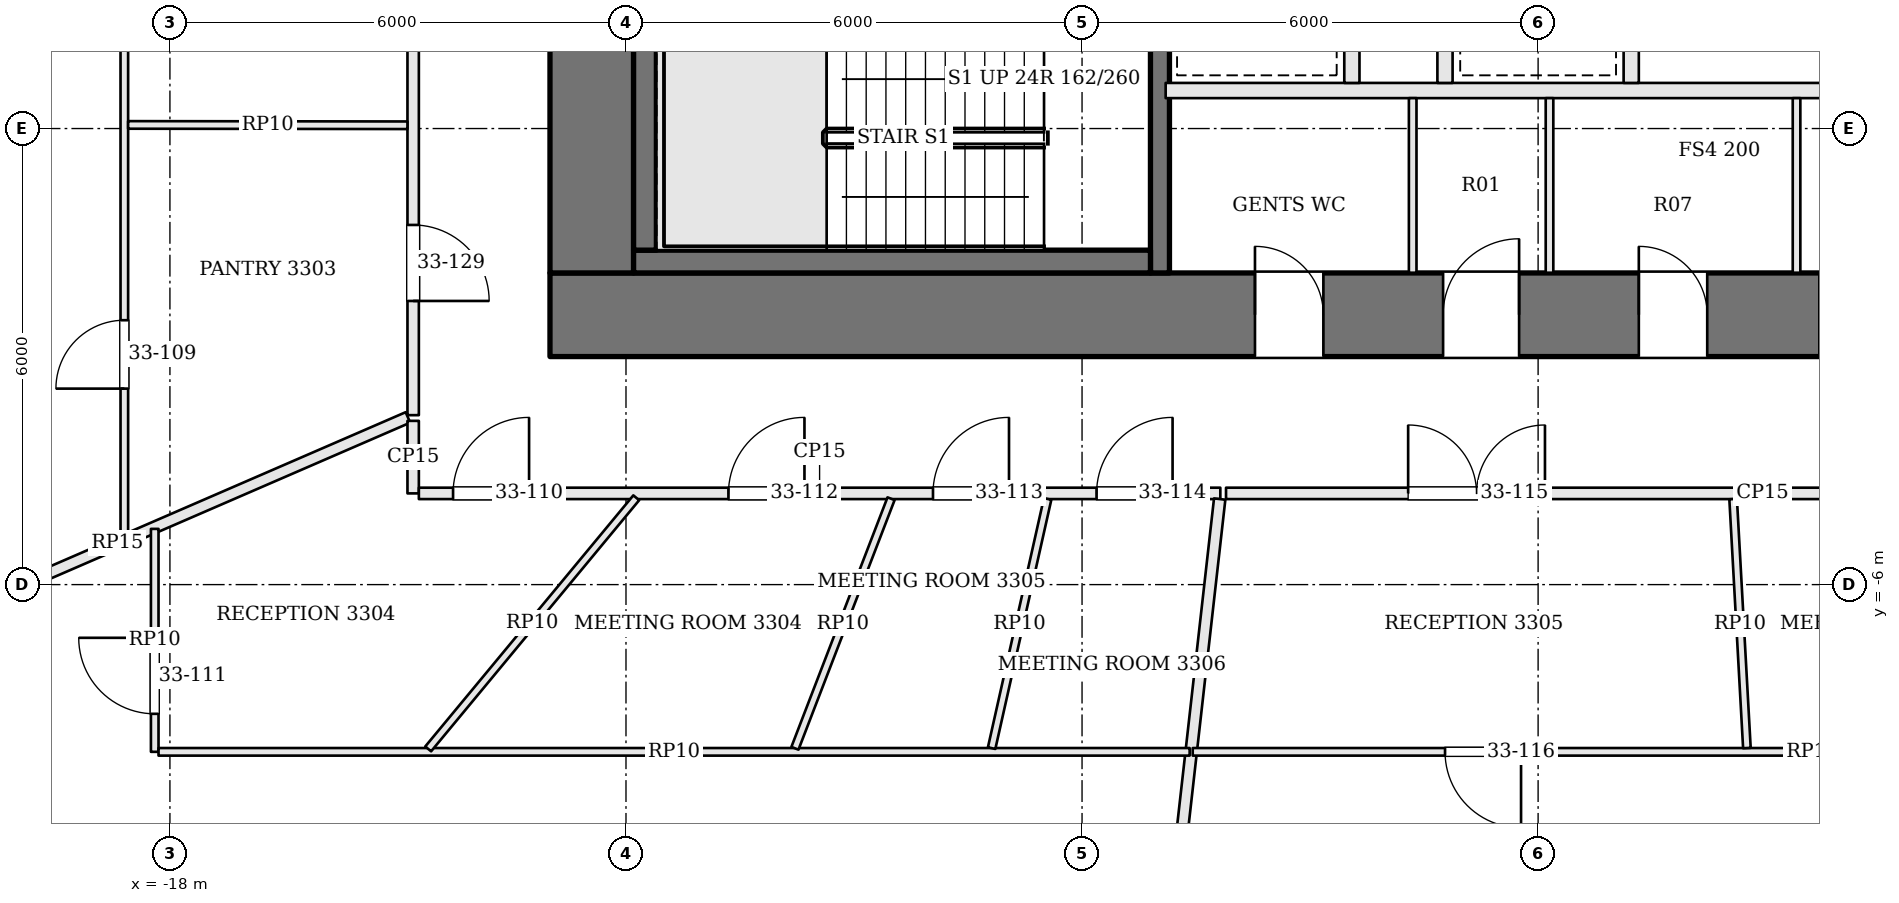
"""IFC4 building model, lengths in metres.
Left out: names, types, materials, properties, quantities, classifications, styles, units other than length and angle.
Written with IfcOpenShell. Run it as: python <this file> out.ifc"""

import sys

from ifc_helpers import new_model, si_unit, direction, frame, frame_2d, origin, place, context, subcontext, project, spatial, rectangle, extrude, element, fill, save


model = new_model("IFC4")
c1 = context("Model", 3, precision=1e-05, world=origin(), true_north=direction((0.0, 1.0)))
c2 = subcontext(c1, "Body", "Model", "MODEL_VIEW")
j1 = project(units=[si_unit("LENGTHUNIT", "METRE"), si_unit("PLANEANGLEUNIT", "RADIAN")], contexts=[c1])
p1 = place(None, origin())
s1 = spatial("IfcSite", under=j1, at=p1, CompositionType="ELEMENT")
p2 = place(p1, origin())
s2 = spatial("IfcBuilding", under=s1, at=p2, CompositionType="ELEMENT")
p3 = place(p2, frame((0.0, 0.0, 138.3)))
s3 = spatial("IfcBuildingStorey", under=s2, at=p3, CompositionType="ELEMENT", Elevation=138.3)
p4 = place(p3, frame((-13.0, -2.45, 0.0), z_axis=(0.0, 0.0, 1.0), x_axis=(1.0, 0.0, 0.0)))
e1 = element("IfcWall", 1, at=p4, inside=s3, PredefinedType="SHEAR", context=c2, shape_type="SweptSolid", body=[
    extrude(rectangle(XDim=26.0, YDim=1.1, at=frame_2d((13.0, 0.0))), origin(), (0.0, 0.0, 1.0), 3.9),
])
p5 = place(p4, frame((9.275, 0.0, 0.0)))
e2 = element("IfcOpeningElement", 2, at=p5, cuts=e1, PredefinedType="OPENING", context=c2, shape_type="SweptSolid", body=[
    extrude(rectangle(XDim=0.9, YDim=2.1, at=frame_2d((0.45, 1.05))), frame((0.0, 0.56, 0.0), z_axis=(0.0, -1.0, 0.0), x_axis=(1.0, 0.0, 0.0)), (0.0, 0.0, 1.0), 1.12),
])
p6 = place(p4, frame((11.75, 0.0, 0.0)))
e3 = element("IfcOpeningElement", 3, at=p6, cuts=e1, PredefinedType="OPENING", context=c2, shape_type="SweptSolid", body=[
    extrude(rectangle(XDim=1.0, YDim=2.1, at=frame_2d((0.5, 1.05))), frame((0.0, 0.56, 0.0), z_axis=(0.0, -1.0, 0.0), x_axis=(1.0, 0.0, 0.0)), (0.0, 0.0, 1.0), 1.12),
])
p7 = place(p4, frame((14.325, 0.0, 0.0)))
e4 = element("IfcOpeningElement", 4, at=p7, cuts=e1, PredefinedType="OPENING", context=c2, shape_type="SweptSolid", body=[
    extrude(rectangle(XDim=0.9, YDim=2.1, at=frame_2d((0.45, 1.05))), frame((0.0, 0.56, 0.0), z_axis=(0.0, -1.0, 0.0), x_axis=(1.0, 0.0, 0.0)), (0.0, 0.0, 1.0), 1.12),
])
p8 = place(p4, frame((16.7, 0.0, 0.0)))
e5 = element("IfcOpeningElement", 5, at=p8, cuts=e1, PredefinedType="OPENING", context=c2, shape_type="SweptSolid", body=[
    extrude(rectangle(XDim=0.9, YDim=2.1, at=frame_2d((0.45, 1.05))), frame((0.0, 0.56, 0.0), z_axis=(0.0, -1.0, 0.0), x_axis=(1.0, 0.0, 0.0)), (0.0, 0.0, 1.0), 1.12),
])
p9 = place(p3, frame((-12.45, -1.9, 0.0), z_axis=(0.0, 0.0, 1.0), x_axis=(0.0, 1.0, 0.0)))
e6 = element("IfcWall", 6, at=p9, inside=s3, PredefinedType="SHEAR", context=c2, shape_type="SweptSolid", body=[
    extrude(rectangle(XDim=12.8, YDim=1.1, at=frame_2d((6.4, 0.0))), origin(), (0.0, 0.0, 1.0), 3.9),
])
p10 = place(p9, frame((3.9, 0.0, 0.0)))
e7 = element("IfcOpeningElement", 7, at=p10, cuts=e6, PredefinedType="OPENING", context=c2, shape_type="SweptSolid", body=[
    extrude(rectangle(XDim=1.8, YDim=2.1, at=frame_2d((0.9, 1.05))), frame((0.0, 0.56, 0.0), z_axis=(0.0, -1.0, 0.0), x_axis=(1.0, 0.0, 0.0)), (0.0, 0.0, 1.0), 1.12),
])
p11 = place(p3, frame((-4.975, -1.9, 0.0), z_axis=(0.0, 0.0, 1.0), x_axis=(0.0, 1.0, 0.0)))
e8 = element("IfcWall", 8, at=p11, inside=s3, PredefinedType="SOLIDWALL", context=c2, shape_type="SweptSolid", body=[
    extrude(rectangle(XDim=12.8, YDim=0.25, at=frame_2d((6.4, 0.0))), origin(), (0.0, 0.0, 1.0), 3.7),
])
p12 = place(p11, frame((4.95, 0.0, 0.0)))
e9 = element("IfcOpeningElement", 9, at=p12, cuts=e8, PredefinedType="OPENING", context=c2, shape_type="SweptSolid", body=[
    extrude(rectangle(XDim=1.2, YDim=2.1, at=frame_2d((0.6, 1.05))), frame((0.0, 0.135, 0.0), z_axis=(0.0, -1.0, 0.0), x_axis=(1.0, 0.0, 0.0)), (0.0, 0.0, 1.0), 0.27),
])
p13 = place(p3, frame((-11.9, -1.75, 0.0), z_axis=(0.0, 0.0, 1.0), x_axis=(1.0, 0.0, 0.0)))
e10 = element("IfcWall", 10, at=p13, inside=s3, PredefinedType="SOLIDWALL", context=c2, shape_type="SweptSolid", body=[
    extrude(rectangle(XDim=6.8, YDim=0.3, at=frame_2d((3.4, 0.0))), origin(), (0.0, 0.0, 1.0), 3.7),
])
p14 = place(p3, frame((-11.75, -1.6, 0.0), z_axis=(0.0, 0.0, 1.0), x_axis=(0.0, 1.0, 0.0)))
e11 = element("IfcWall", 11, at=p14, inside=s3, PredefinedType="SOLIDWALL", context=c2, shape_type="SweptSolid", body=[
    extrude(rectangle(XDim=2.95, YDim=0.3, at=frame_2d((1.475, 0.0))), origin(), (0.0, 0.0, 1.0), 3.7),
])
p15 = place(p3, frame((-4.9, 0.5, 0.0), z_axis=(0.0, 0.0, 1.0), x_axis=(1.0, 0.0, 0.0)))
e12 = element("IfcWall", 12, at=p15, inside=s3, PredefinedType="SOLIDWALL", context=c2, shape_type="SweptSolid", body=[
    extrude(rectangle(XDim=9.8, YDim=0.2, at=frame_2d((4.9, 0.0))), origin(), (0.0, 0.0, 1.0), 3.7),
])
for number, where, z_axis, x_axis in (
    (13, (-2.45, 0.6, 0.0), (0.0, 0.0, 1.0), (0.0, 1.0, 0.0)),
    (14, (-1.225, 0.6, 0.0), (0.0, 0.0, 1.0), (0.0, 1.0, 0.0)),
    (15, (1.225, 0.6, 0.0), (0.0, 0.0, 1.0), (0.0, 1.0, 0.0)),
):
    element("IfcWall", number, at=place(p3, frame(where, z_axis=z_axis, x_axis=x_axis)), inside=s3, PredefinedType="SOLIDWALL", context=c2, shape_type="SweptSolid", body=[
        extrude(rectangle(XDim=2.2, YDim=0.2, at=frame_2d((1.1, 0.0))), origin(), (0.0, 0.0, 1.0), 3.7),
    ])
for number, where, z_axis, x_axis in (
    (16, (-1.65, -1.9, 0.0), (0.0, 0.0, 1.0), (0.0, 1.0, 0.0)),
    (17, (0.15, -1.9, 0.0), (0.0, 0.0, 1.0), (0.0, 1.0, 0.0)),
    (18, (3.4, -1.9, 0.0), (0.0, 0.0, 1.0), (0.0, 1.0, 0.0)),
):
    element("IfcWall", number, at=place(p3, frame(where, z_axis=z_axis, x_axis=x_axis)), inside=s3, PredefinedType="PARTITIONING", context=c2, shape_type="SweptSolid", body=[
        extrude(rectangle(XDim=2.3, YDim=0.1, at=frame_2d((1.15, 0.0))), origin(), (0.0, 0.0, 1.0), 3.7),
    ])
p16 = place(p3, frame((-14.8, 12.882, 0.0), z_axis=(0.0, 0.0, 1.0), x_axis=(0.0, -1.0, 0.0)))
e19 = element("IfcWall", 19, at=p16, inside=s3, PredefinedType="PARTITIONING", context=c2, shape_type="SweptSolid", body=[
    extrude(rectangle(XDim=16.652, YDim=0.15, at=frame_2d((8.326, 0.0))), origin(), (0.0, 0.0, 1.0), 3.198),
])
p17 = place(p16, frame((2.599, 0.0, 0.0)))
e20 = element("IfcOpeningElement", 20, at=p17, cuts=e19, PredefinedType="OPENING", context=c2, shape_type="SweptSolid", body=[
    extrude(rectangle(XDim=1.8, YDim=2.1, at=frame_2d((0.9, 1.05))), frame((0.0, 0.085, 0.0), z_axis=(0.0, -1.0, 0.0), x_axis=(1.0, 0.0, 0.0)), (0.0, 0.0, 1.0), 0.17),
])
p18 = place(p16, frame((9.456, 0.0, 0.0)))
e21 = element("IfcOpeningElement", 21, at=p18, cuts=e19, PredefinedType="OPENING", context=c2, shape_type="SweptSolid", body=[
    extrude(rectangle(XDim=1.0, YDim=2.4, at=frame_2d((0.5, 1.2))), frame((0.0, 0.085, 0.0), z_axis=(0.0, -1.0, 0.0), x_axis=(1.0, 0.0, 0.0)), (0.0, 0.0, 1.0), 0.17),
])
p19 = place(p16, frame((14.15, 0.0, 0.0)))
e22 = element("IfcOpeningElement", 22, at=p19, cuts=e19, PredefinedType="OPENING", context=c2, shape_type="SweptSolid", body=[
    extrude(rectangle(XDim=1.0, YDim=2.1, at=frame_2d((0.5, 1.05))), frame((0.0, 0.085, 0.0), z_axis=(0.0, -1.0, 0.0), x_axis=(1.0, 0.0, 0.0)), (0.0, 0.0, 1.0), 0.17),
])
p20 = place(p3, frame((-22.514, -7.116, 0.0), z_axis=(0.0, 0.0, 1.0), x_axis=(0.917457618692, 0.397833530392, 0.0)))
e23 = element("IfcWall", 23, at=p20, inside=s3, PredefinedType="PARTITIONING", context=c2, shape_type="SweptSolid", body=[
    extrude(rectangle(XDim=8.333, YDim=0.15, at=frame_2d((4.167, 0.0))), origin(), (0.0, 0.0, 1.0), 3.198),
])
p21 = place(p3, frame((-14.8, -3.846, 0.0), z_axis=(0.0, 0.0, 1.0), x_axis=(0.0, -1.0, 0.0)))
e24 = element("IfcWall", 24, at=p21, inside=s3, PredefinedType="PARTITIONING", context=c2, shape_type="SweptSolid", body=[
    extrude(rectangle(XDim=0.954, YDim=0.15, at=frame_2d((0.477, 0.0))), origin(), (0.0, 0.0, 1.0), 3.198),
])
p22 = place(p3, frame((-14.725, -4.8, 0.0), z_axis=(0.0, 0.0, 1.0), x_axis=(1.0, 0.0, 0.0)))
e25 = element("IfcWall", 25, at=p22, inside=s3, PredefinedType="PARTITIONING", context=c2, shape_type="SweptSolid", body=[
    extrude(rectangle(XDim=10.544, YDim=0.15, at=frame_2d((5.272, 0.0))), origin(), (0.0, 0.0, 1.0), 3.198),
])
p23 = place(p22, frame((0.45, 0.0, 0.0)))
e26 = element("IfcOpeningElement", 26, at=p23, cuts=e25, PredefinedType="OPENING", context=c2, shape_type="SweptSolid", body=[
    extrude(rectangle(XDim=1.0, YDim=2.1, at=frame_2d((0.5, 1.05))), frame((0.0, 0.085, 0.0), z_axis=(0.0, -1.0, 0.0), x_axis=(1.0, 0.0, 0.0)), (0.0, 0.0, 1.0), 0.17),
])
p24 = place(p22, frame((4.073, 0.0, 0.0)))
e27 = element("IfcOpeningElement", 27, at=p24, cuts=e25, PredefinedType="OPENING", context=c2, shape_type="SweptSolid", body=[
    extrude(rectangle(XDim=1.0, YDim=2.4, at=frame_2d((0.5, 1.2))), frame((0.0, 0.085, 0.0), z_axis=(0.0, -1.0, 0.0), x_axis=(1.0, 0.0, 0.0)), (0.0, 0.0, 1.0), 0.17),
])
p25 = place(p22, frame((6.764, 0.0, 0.0)))
e28 = element("IfcOpeningElement", 28, at=p25, cuts=e25, PredefinedType="OPENING", context=c2, shape_type="SweptSolid", body=[
    extrude(rectangle(XDim=1.0, YDim=2.4, at=frame_2d((0.5, 1.2))), frame((0.0, 0.085, 0.0), z_axis=(0.0, -1.0, 0.0), x_axis=(1.0, 0.0, 0.0)), (0.0, 0.0, 1.0), 0.17),
])
p26 = place(p22, frame((8.916, 0.0, 0.0)))
e29 = element("IfcOpeningElement", 29, at=p26, cuts=e25, PredefinedType="OPENING", context=c2, shape_type="SweptSolid", body=[
    extrude(rectangle(XDim=1.0, YDim=2.4, at=frame_2d((0.5, 1.2))), frame((0.0, 0.085, 0.0), z_axis=(0.0, -1.0, 0.0), x_axis=(1.0, 0.0, 0.0)), (0.0, 0.0, 1.0), 0.17),
])
p27 = place(p3, frame((-5.59, -17.294, 0.0), z_axis=(0.0, 0.0, 1.0), x_axis=(0.112047950982, 0.993702800983, 0.0)))
e30 = element("IfcWall", 30, at=p27, inside=s3, PredefinedType="PARTITIONING", context=c2, shape_type="SweptSolid", body=[
    extrude(rectangle(XDim=12.498, YDim=0.15, at=frame_2d((6.249, 0.0))), origin(), (0.0, 0.0, 1.0), 3.198),
])
p28 = place(p3, frame((-4.106, -4.8, 0.0), z_axis=(0.0, 0.0, 1.0), x_axis=(1.0, 0.0, 0.0)))
e31 = element("IfcWall", 31, at=p28, inside=s3, PredefinedType="PARTITIONING", context=c2, shape_type="SweptSolid", body=[
    extrude(rectangle(XDim=14.117, YDim=0.15, at=frame_2d((7.059, 0.0))), origin(), (0.0, 0.0, 1.0), 3.198),
])
p29 = place(p28, frame((2.396, 0.0, 0.0)))
e32 = element("IfcOpeningElement", 32, at=p29, cuts=e31, PredefinedType="OPENING", context=c2, shape_type="SweptSolid", body=[
    extrude(rectangle(XDim=1.8, YDim=2.1, at=frame_2d((0.9, 1.05))), frame((0.0, 0.085, 0.0), z_axis=(0.0, -1.0, 0.0), x_axis=(1.0, 0.0, 0.0)), (0.0, 0.0, 1.0), 0.17),
])
p30 = place(p28, frame((8.053, 0.0, 0.0)))
e33 = element("IfcOpeningElement", 33, at=p30, cuts=e31, PredefinedType="OPENING", context=c2, shape_type="SweptSolid", body=[
    extrude(rectangle(XDim=1.0, YDim=2.4, at=frame_2d((0.5, 1.2))), frame((0.0, 0.085, 0.0), z_axis=(0.0, -1.0, 0.0), x_axis=(1.0, 0.0, 0.0)), (0.0, 0.0, 1.0), 0.17),
])
p31 = place(p3, frame((-18.6, -5.397, 0.0), z_axis=(0.0, 0.0, 1.0), x_axis=(0.0, 1.0, 0.0)))
e34 = element("IfcWall", 34, at=p31, inside=s3, PredefinedType="PARTITIONING", context=c2, shape_type="SweptSolid", body=[
    extrude(rectangle(XDim=16.919, YDim=0.1, at=frame_2d((8.459, 0.0))), origin(), (0.0, 0.0, 1.0), 3.184),
])
p32 = place(p31, frame((1.975, 0.0, 0.0)))
e35 = element("IfcOpeningElement", 35, at=p32, cuts=e34, PredefinedType="OPENING", context=c2, shape_type="SweptSolid", body=[
    extrude(rectangle(XDim=0.9, YDim=2.1, at=frame_2d((0.45, 1.05))), frame((0.0, 0.06, 0.0), z_axis=(0.0, -1.0, 0.0), x_axis=(1.0, 0.0, 0.0)), (0.0, 0.0, 1.0), 0.12),
])
p33 = place(p31, frame((7.95, 0.0, 0.0)))
e36 = element("IfcOpeningElement", 36, at=p33, cuts=e34, PredefinedType="OPENING", context=c2, shape_type="SweptSolid", body=[
    extrude(rectangle(XDim=1.0, YDim=2.4, at=frame_2d((0.5, 1.2))), frame((0.0, 0.06, 0.0), z_axis=(0.0, -1.0, 0.0), x_axis=(1.0, 0.0, 0.0)), (0.0, 0.0, 1.0), 0.12),
])
p34 = place(p3, frame((-14.875, 0.043, 0.0), z_axis=(0.0, 0.0, 1.0), x_axis=(-0.999999285062, 0.001195774074, 0.0)))
e37 = element("IfcWall", 37, at=p34, inside=s3, PredefinedType="PARTITIONING", context=c2, shape_type="SweptSolid", body=[
    extrude(rectangle(XDim=3.675, YDim=0.1, at=frame_2d((1.837, 0.0))), origin(), (0.0, 0.0, 1.0), 3.184),
])
p35 = place(p3, frame((-18.2, -8.2, 0.0), z_axis=(0.0, 0.0, 1.0), x_axis=(0.0, 1.0, 0.0)))
e38 = element("IfcWall", 38, at=p35, inside=s3, PredefinedType="PARTITIONING", context=c2, shape_type="SweptSolid", body=[
    extrude(rectangle(XDim=2.933, YDim=0.1, at=frame_2d((1.467, 0.0))), origin(), (0.0, 0.0, 1.0), 3.184),
])
p36 = place(p35, frame((0.5, 0.0, 0.0)))
e39 = element("IfcOpeningElement", 39, at=p36, cuts=e38, PredefinedType="OPENING", context=c2, shape_type="SweptSolid", body=[
    extrude(rectangle(XDim=1.0, YDim=2.1, at=frame_2d((0.5, 1.05))), frame((0.0, 0.06, 0.0), z_axis=(0.0, -1.0, 0.0), x_axis=(1.0, 0.0, 0.0)), (0.0, 0.0, 1.0), 0.12),
])
p37 = place(p3, frame((-4.584, -8.2, 0.0), z_axis=(0.0, 0.0, 1.0), x_axis=(-1.0, 0.0, 0.0)))
e40 = element("IfcWall", 40, at=p37, inside=s3, PredefinedType="PARTITIONING", context=c2, shape_type="SweptSolid", body=[
    extrude(rectangle(XDim=13.566, YDim=0.1, at=frame_2d((6.783, 0.0))), origin(), (0.0, 0.0, 1.0), 3.184),
])
p38 = place(p3, frame((-11.865, -4.858, 0.0), z_axis=(0.0, 0.0, 1.0), x_axis=(-0.638010152626, -0.770027950886, 0.0)))
e41 = element("IfcWall", 41, at=p38, inside=s3, PredefinedType="PARTITIONING", context=c2, shape_type="SweptSolid", body=[
    extrude(rectangle(XDim=4.29, YDim=0.1, at=frame_2d((2.145, 0.0))), origin(), (0.0, 0.0, 1.0), 3.184),
])
p39 = place(p3, frame((-8.513, -4.87, 0.0), z_axis=(0.0, 0.0, 1.0), x_axis=(-0.359444024243, -0.933166648266, 0.0)))
e42 = element("IfcWall", 42, at=p39, inside=s3, PredefinedType="PARTITIONING", context=c2, shape_type="SweptSolid", body=[
    extrude(rectangle(XDim=3.518, YDim=0.1, at=frame_2d((1.759, 0.0))), origin(), (0.0, 0.0, 1.0), 3.184),
])
p40 = place(p3, frame((-6.453, -4.873, 0.0), z_axis=(0.0, 0.0, 1.0), x_axis=(-0.21917670953, -0.975685179758, 0.0)))
e43 = element("IfcWall", 43, at=p40, inside=s3, PredefinedType="PARTITIONING", context=c2, shape_type="SweptSolid", body=[
    extrude(rectangle(XDim=3.36, YDim=0.1, at=frame_2d((1.68, 0.0))), origin(), (0.0, 0.0, 1.0), 3.184),
])
p41 = place(p3, frame((11.76, -8.2, 0.0), z_axis=(0.0, 0.0, 1.0), x_axis=(-1.0, 0.0, 0.0)))
e44 = element("IfcWall", 44, at=p41, inside=s3, PredefinedType="PARTITIONING", context=c2, shape_type="SweptSolid", body=[
    extrude(rectangle(XDim=16.305, YDim=0.1, at=frame_2d((8.152, 0.0))), origin(), (0.0, 0.0, 1.0), 3.184),
])
p42 = place(p41, frame((11.985, 0.0, 0.0)))
e45 = element("IfcOpeningElement", 45, at=p42, cuts=e44, PredefinedType="OPENING", context=c2, shape_type="SweptSolid", body=[
    extrude(rectangle(XDim=1.0, YDim=2.1, at=frame_2d((0.5, 1.05))), frame((0.0, 0.06, 0.0), z_axis=(0.0, -1.0, 0.0), x_axis=(1.0, 0.0, 0.0)), (0.0, 0.0, 1.0), 0.12),
])
p43 = place(p41, frame((1.674, 0.0, 0.0)))
e46 = element("IfcOpeningElement", 46, at=p43, cuts=e44, PredefinedType="OPENING", context=c2, shape_type="SweptSolid", body=[
    extrude(rectangle(XDim=0.9, YDim=2.1, at=frame_2d((0.45, 1.05))), frame((0.0, 0.06, 0.0), z_axis=(0.0, -1.0, 0.0), x_axis=(1.0, 0.0, 0.0)), (0.0, 0.0, 1.0), 0.12),
])
p44 = place(p3, frame((2.566, -4.875, 0.0), z_axis=(0.0, 0.0, 1.0), x_axis=(0.05515260166, -0.998477936927, 0.0)))
e47 = element("IfcWall", 47, at=p44, inside=s3, PredefinedType="PARTITIONING", context=c2, shape_type="SweptSolid", body=[
    extrude(rectangle(XDim=3.28, YDim=0.1, at=frame_2d((1.64, 0.0))), origin(), (0.0, 0.0, 1.0), 3.184),
])
p45 = place(p5, origin())
e48 = element("IfcDoor", 48, at=p45, inside=s3, OperationType="SINGLE_SWING_LEFT", PredefinedType="DOOR", context=c2, shape_type="SweptSolid", body=[
    extrude(rectangle(XDim=0.9, YDim=2.1, at=frame_2d((0.45, 1.05))), frame((0.0, 0.025, 0.0), z_axis=(0.0, -1.0, 0.0), x_axis=(1.0, 0.0, 0.0)), (0.0, 0.0, 1.0), 0.05),
])
fill(e2, e48)
p46 = place(p6, origin())
e49 = element("IfcDoor", 49, at=p46, inside=s3, OperationType="SINGLE_SWING_RIGHT", PredefinedType="DOOR", context=c2, shape_type="SweptSolid", body=[
    extrude(rectangle(XDim=1.0, YDim=2.1, at=frame_2d((0.5, 1.05))), frame((0.0, 0.025, 0.0), z_axis=(0.0, -1.0, 0.0), x_axis=(1.0, 0.0, 0.0)), (0.0, 0.0, 1.0), 0.05),
])
fill(e3, e49)
p47 = place(p7, origin())
e50 = element("IfcDoor", 50, at=p47, inside=s3, OperationType="SINGLE_SWING_LEFT", PredefinedType="DOOR", context=c2, shape_type="SweptSolid", body=[
    extrude(rectangle(XDim=0.9, YDim=2.1, at=frame_2d((0.45, 1.05))), frame((0.0, 0.025, 0.0), z_axis=(0.0, -1.0, 0.0), x_axis=(1.0, 0.0, 0.0)), (0.0, 0.0, 1.0), 0.05),
])
fill(e4, e50)
p48 = place(p32, origin())
e51 = element("IfcDoor", 51, at=p48, inside=s3, OperationType="SINGLE_SWING_LEFT", PredefinedType="DOOR", context=c2, shape_type="SweptSolid", body=[
    extrude(rectangle(XDim=0.9, YDim=2.1, at=frame_2d((0.45, 1.05))), frame((0.0, 0.025, 0.0), z_axis=(0.0, -1.0, 0.0), x_axis=(1.0, 0.0, 0.0)), (0.0, 0.0, 1.0), 0.05),
])
fill(e35, e51)
p49 = place(p23, origin())
e52 = element("IfcDoor", 52, at=p49, inside=s3, OperationType="SINGLE_SWING_RIGHT", PredefinedType="DOOR", context=c2, shape_type="SweptSolid", body=[
    extrude(rectangle(XDim=1.0, YDim=2.1, at=frame_2d((0.5, 1.05))), frame((0.0, 0.025, 0.0), z_axis=(0.0, -1.0, 0.0), x_axis=(1.0, 0.0, 0.0)), (0.0, 0.0, 1.0), 0.05),
])
fill(e26, e52)
p50 = place(p36, origin())
e53 = element("IfcDoor", 53, at=p50, inside=s3, OperationType="SINGLE_SWING_RIGHT", PredefinedType="DOOR", context=c2, shape_type="SweptSolid", body=[
    extrude(rectangle(XDim=1.0, YDim=2.1, at=frame_2d((0.5, 1.05))), frame((0.0, 0.025, 0.0), z_axis=(0.0, -1.0, 0.0), x_axis=(1.0, 0.0, 0.0)), (0.0, 0.0, 1.0), 0.05),
])
fill(e39, e53)
p51 = place(p24, origin())
e54 = element("IfcDoor", 54, at=p51, inside=s3, OperationType="SINGLE_SWING_RIGHT", PredefinedType="DOOR", context=c2, shape_type="SweptSolid", body=[
    extrude(rectangle(XDim=1.0, YDim=2.4, at=frame_2d((0.5, 1.2))), frame((0.0, 0.025, 0.0), z_axis=(0.0, -1.0, 0.0), x_axis=(1.0, 0.0, 0.0)), (0.0, 0.0, 1.0), 0.05),
])
fill(e27, e54)
p52 = place(p25, origin())
e55 = element("IfcDoor", 55, at=p52, inside=s3, OperationType="SINGLE_SWING_RIGHT", PredefinedType="DOOR", context=c2, shape_type="SweptSolid", body=[
    extrude(rectangle(XDim=1.0, YDim=2.4, at=frame_2d((0.5, 1.2))), frame((0.0, 0.025, 0.0), z_axis=(0.0, -1.0, 0.0), x_axis=(1.0, 0.0, 0.0)), (0.0, 0.0, 1.0), 0.05),
])
fill(e28, e55)
p53 = place(p26, origin())
e56 = element("IfcDoor", 56, at=p53, inside=s3, OperationType="SINGLE_SWING_RIGHT", PredefinedType="DOOR", context=c2, shape_type="SweptSolid", body=[
    extrude(rectangle(XDim=1.0, YDim=2.4, at=frame_2d((0.5, 1.2))), frame((0.0, 0.025, 0.0), z_axis=(0.0, -1.0, 0.0), x_axis=(1.0, 0.0, 0.0)), (0.0, 0.0, 1.0), 0.05),
])
fill(e29, e56)
p54 = place(p29, origin())
e57 = element("IfcDoor", 57, at=p54, inside=s3, OperationType="DOUBLE_DOOR_SINGLE_SWING", PredefinedType="DOOR", context=c2, shape_type="SweptSolid", body=[
    extrude(rectangle(XDim=1.8, YDim=2.1, at=frame_2d((0.9, 1.05))), frame((0.0, 0.025, 0.0), z_axis=(0.0, -1.0, 0.0), x_axis=(1.0, 0.0, 0.0)), (0.0, 0.0, 1.0), 0.05),
])
fill(e32, e57)
p55 = place(p42, origin())
e58 = element("IfcDoor", 58, at=p55, inside=s3, OperationType="SINGLE_SWING_LEFT", PredefinedType="DOOR", context=c2, shape_type="SweptSolid", body=[
    extrude(rectangle(XDim=1.0, YDim=2.1, at=frame_2d((0.5, 1.05))), frame((0.0, 0.025, 0.0), z_axis=(0.0, -1.0, 0.0), x_axis=(1.0, 0.0, 0.0)), (0.0, 0.0, 1.0), 0.05),
])
fill(e45, e58)
p56 = place(p19, origin())
e59 = element("IfcDoor", 59, at=p56, inside=s3, OperationType="SINGLE_SWING_RIGHT", PredefinedType="DOOR", context=c2, shape_type="SweptSolid", body=[
    extrude(rectangle(XDim=1.0, YDim=2.1, at=frame_2d((0.5, 1.05))), frame((0.0, 0.025, 0.0), z_axis=(0.0, -1.0, 0.0), x_axis=(1.0, 0.0, 0.0)), (0.0, 0.0, 1.0), 0.05),
])
fill(e22, e59)
save(model, sys.argv[1])
